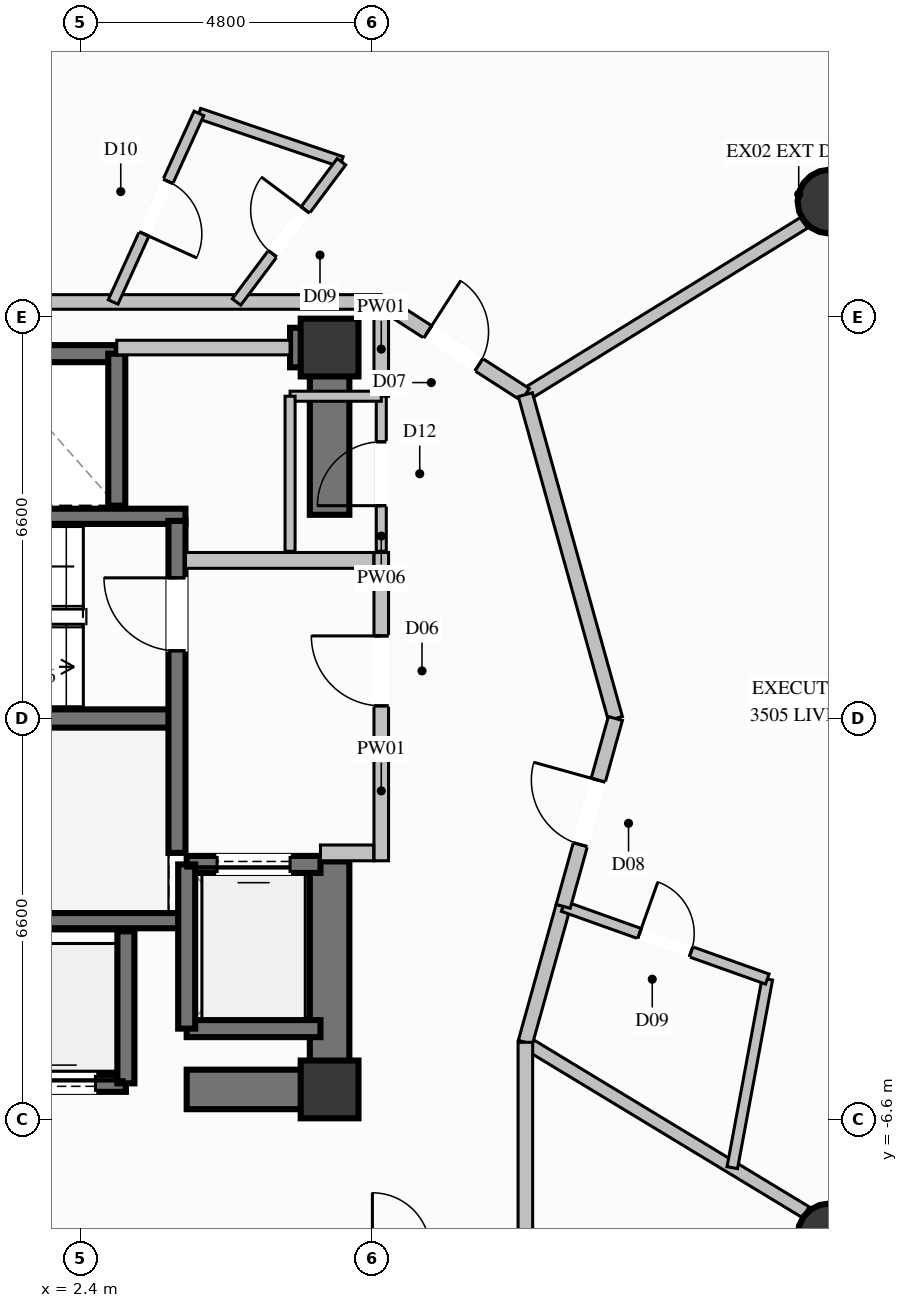
"""IFC4 building model, lengths in metres.
Left out: names, types, materials, properties, quantities, classifications, styles, units other than length and angle.
Written with IfcOpenShell. Run it as: python <this file> out.ifc"""

import sys

from ifc_helpers import new_model, si_unit, direction, frame, frame_2d, origin, origin_2d, place, context, subcontext, project, spatial, rectangle, circle, extrude, element, fill, save


model = new_model("IFC4")
c1 = context("Model", 3, precision=1e-05, world=origin(), true_north=direction((0.0, 1.0)))
c2 = subcontext(c1, "Body", "Model", "MODEL_VIEW")
j1 = project(units=[si_unit("LENGTHUNIT", "METRE"), si_unit("PLANEANGLEUNIT", "RADIAN")], contexts=[c1])
p1 = place(None, origin())
s1 = spatial("IfcSite", under=j1, at=p1, CompositionType="ELEMENT")
p2 = place(p1, origin())
s2 = spatial("IfcBuilding", under=s1, at=p2, CompositionType="ELEMENT")
p3 = place(p2, frame((0.0, 0.0, 131.4)))
s3 = spatial("IfcBuildingStorey", under=s2, at=p3, CompositionType="ELEMENT", Elevation=131.4)
for number, where, z_axis, x_axis in (
    (1, (6.5, -6.1, 0.0), (0.0, 0.0, 1.0), (1.0, 0.0, 0.0)),
    (2, (6.5, 6.1, 0.0), (0.0, 0.0, 1.0), (1.0, 0.0, 0.0)),
):
    element("IfcColumn", number, at=place(p3, frame(where, z_axis=z_axis, x_axis=x_axis)), inside=s3, PredefinedType="COLUMN", context=c2, shape_type="SweptSolid", body=[
        extrude(rectangle(XDim=0.95, YDim=0.95, at=origin_2d()), origin(), (0.0, 0.0, 1.0), 3.6),
    ])
p4 = place(p3, frame((-3.99, 0.0, 0.0), z_axis=(0.0, 0.0, 1.0), x_axis=(1.0, 0.0, 0.0)))
e3 = element("IfcWall", 3, at=p4, inside=s3, PredefinedType="SHEAR", context=c2, shape_type="SweptSolid", body=[
    extrude(rectangle(XDim=7.98, YDim=0.3, at=frame_2d((3.99, 0.0))), origin(), (0.0, 0.0, 1.0), 3.6),
])
for number, where, z_axis, x_axis in (
    (4, (-4.13, -3.325, 0.0), (0.0, 0.0, 1.0), (1.0, 0.0, 0.0)),
    (5, (-4.13, 3.325, 0.0), (0.0, 0.0, 1.0), (1.0, 0.0, 0.0)),
):
    element("IfcWall", number, at=place(p3, frame(where, z_axis=z_axis, x_axis=x_axis)), inside=s3, PredefinedType="SOLIDWALL", context=c2, shape_type="SweptSolid", body=[
        extrude(rectangle(XDim=8.26, YDim=0.25, at=frame_2d((4.13, 0.0))), origin(), (0.0, 0.0, 1.0), 3.6),
    ])
p5 = place(p3, frame((4.15, -6.1, 0.0), z_axis=(0.0, 0.0, 1.0), x_axis=(1.0, 0.0, 0.0)))
e6 = element("IfcWall", 6, at=p5, inside=s3, PredefinedType="SHEAR", context=c2, shape_type="SweptSolid", body=[
    extrude(rectangle(XDim=2.025, YDim=0.65, at=frame_2d((1.013, 0.0))), origin(), (0.0, 0.0, 1.0), 3.6),
])
p6 = place(p3, frame((5.85, 6.1, 0.0), z_axis=(0.0, 0.0, 1.0), x_axis=(1.0, 0.0, 0.0)))
e7 = element("IfcWall", 7, at=p6, inside=s3, PredefinedType="SHEAR", context=c2, shape_type="SweptSolid", body=[
    extrude(rectangle(XDim=0.325, YDim=0.65, at=frame_2d((0.163, 0.0))), origin(), (0.0, 0.0, 1.0), 3.6),
])
p7 = place(p3, frame((6.5, -6.425, 0.0), z_axis=(0.0, 0.0, 1.0), x_axis=(0.0, 1.0, 0.0)))
e8 = element("IfcWall", 8, at=p7, inside=s3, PredefinedType="SHEAR", context=c2, shape_type="SweptSolid", body=[
    extrude(rectangle(XDim=4.075, YDim=0.65, at=frame_2d((2.038, 0.0))), origin(), (0.0, 0.0, 1.0), 3.6),
])
p8 = place(p3, frame((6.5, 3.35, 0.0), z_axis=(0.0, 0.0, 1.0), x_axis=(0.0, 1.0, 0.0)))
e9 = element("IfcWall", 9, at=p8, inside=s3, PredefinedType="SHEAR", context=c2, shape_type="SweptSolid", body=[
    extrude(rectangle(XDim=3.075, YDim=0.65, at=frame_2d((1.538, 0.0))), origin(), (0.0, 0.0, 1.0), 3.6),
])
for number, where, z_axis, x_axis in (
    (10, (14.722, 8.5, 0.0), (0.0, 0.0, 1.0), (1.0, 0.0, 0.0)),
    (11, (14.722, -8.5, 0.0), (0.0, 0.0, 1.0), (1.0, 0.0, 0.0)),
):
    element("IfcColumn", number, at=place(p3, frame(where, z_axis=z_axis, x_axis=x_axis)), inside=s3, PredefinedType="COLUMN", context=c2, shape_type="SweptSolid", body=[
        extrude(circle(Radius=0.525, at=origin_2d()), origin(), (0.0, 0.0, 1.0), 3.6),
    ])
p9 = place(p3, frame((11.78, 15.585, 0.0), z_axis=(0.0, 0.0, 1.0), x_axis=(0.679203838045, -0.733949689274, 0.0)))
e12 = element("IfcWall", 12, at=p9, inside=s3, PredefinedType="SOLIDWALL", context=c2, shape_type="SweptSolid", body=[
    extrude(rectangle(XDim=7.559, YDim=0.32, at=frame_2d((3.779, 0.0))), origin(), (0.0, 0.0, 1.0), 3.35),
])
p10 = place(p9, frame((3.229, 0.0, 0.0)))
e13 = element("IfcOpeningElement", 13, at=p10, cuts=e12, PredefinedType="OPENING", context=c2, shape_type="SweptSolid", body=[
    extrude(rectangle(XDim=1.1, YDim=2.2, at=frame_2d((0.55, 1.1))), frame((0.0, 0.17, 0.0), z_axis=(0.0, -1.0, 0.0), x_axis=(1.0, 0.0, 0.0)), (0.0, 0.0, 1.0), 0.34),
])
p11 = place(p3, frame((1.05, -6.0, 0.0), z_axis=(0.0, 0.0, 1.0), x_axis=(1.0, 0.0, 0.0)))
e14 = element("IfcWall", 14, at=p11, inside=s3, PredefinedType="SOLIDWALL", context=c2, shape_type="SweptSolid", body=[
    extrude(rectangle(XDim=2.1, YDim=0.28, at=frame_2d((1.05, 0.0))), origin(), (0.0, 0.0, 1.0), 3.35),
])
p12 = place(p11, frame((0.5, 0.0, 0.0)))
e15 = element("IfcOpeningElement", 15, at=p12, cuts=e14, PredefinedType="OPENING", context=c2, shape_type="SweptSolid", body=[
    extrude(rectangle(XDim=1.1, YDim=2.2, at=frame_2d((0.55, 1.1))), frame((0.0, 0.15, 0.0), z_axis=(0.0, -1.0, 0.0), x_axis=(1.0, 0.0, 0.0)), (0.0, 0.0, 1.0), 0.3),
])
p13 = place(p3, frame((3.15, -6.0, 0.0), z_axis=(0.0, 0.0, 1.0), x_axis=(0.0, 1.0, 0.0)))
e16 = element("IfcWall", 16, at=p13, inside=s3, PredefinedType="SOLIDWALL", context=c2, shape_type="SweptSolid", body=[
    extrude(rectangle(XDim=2.5, YDim=0.28, at=frame_2d((1.25, 0.0))), origin(), (0.0, 0.0, 1.0), 3.35),
])
p14 = place(p3, frame((3.0, 6.0, 0.0), z_axis=(0.0, 0.0, 1.0), x_axis=(-1.0, 0.0, 0.0)))
e17 = element("IfcWall", 17, at=p14, inside=s3, PredefinedType="SOLIDWALL", context=c2, shape_type="SweptSolid", body=[
    extrude(rectangle(XDim=2.2, YDim=0.28, at=frame_2d((1.1, 0.0))), origin(), (0.0, 0.0, 1.0), 3.35),
])
p15 = place(p3, frame((3.0, 3.5, 0.0), z_axis=(0.0, 0.0, 1.0), x_axis=(0.0, 1.0, 0.0)))
e18 = element("IfcWall", 18, at=p15, inside=s3, PredefinedType="SOLIDWALL", context=c2, shape_type="SweptSolid", body=[
    extrude(rectangle(XDim=2.5, YDim=0.28, at=frame_2d((1.25, 0.0))), origin(), (0.0, 0.0, 1.0), 3.35),
])
p16 = place(p3, frame((4.15, -5.1, 0.0), z_axis=(0.0, 0.0, 1.0), x_axis=(1.0, 0.0, 0.0)))
e19 = element("IfcWall", 19, at=p16, inside=s3, PredefinedType="SOLIDWALL", context=c2, shape_type="SweptSolid", body=[
    extrude(rectangle(XDim=2.2, YDim=0.28, at=frame_2d((1.1, 0.0))), origin(), (0.0, 0.0, 1.0), 3.35),
])
p17 = place(p3, frame((6.35, -2.4, 0.0), z_axis=(0.0, 0.0, 1.0), x_axis=(-1.0, 0.0, 0.0)))
e20 = element("IfcWall", 20, at=p17, inside=s3, PredefinedType="SOLIDWALL", context=c2, shape_type="SweptSolid", body=[
    extrude(rectangle(XDim=2.2, YDim=0.28, at=frame_2d((1.1, 0.0))), origin(), (0.0, 0.0, 1.0), 3.35),
])
p18 = place(p17, frame((0.5, 0.0, 0.0)))
e21 = element("IfcOpeningElement", 21, at=p18, cuts=e20, PredefinedType="OPENING", context=c2, shape_type="SweptSolid", body=[
    extrude(rectangle(XDim=1.2, YDim=2.2, at=frame_2d((0.6, 1.1))), frame((0.0, 0.15, 0.0), z_axis=(0.0, -1.0, 0.0), x_axis=(1.0, 0.0, 0.0)), (0.0, 0.0, 1.0), 0.3),
])
p19 = place(p3, frame((4.15, -2.4, 0.0), z_axis=(0.0, 0.0, 1.0), x_axis=(0.0, -1.0, 0.0)))
e22 = element("IfcWall", 22, at=p19, inside=s3, PredefinedType="SOLIDWALL", context=c2, shape_type="SweptSolid", body=[
    extrude(rectangle(XDim=2.7, YDim=0.28, at=frame_2d((1.35, 0.0))), origin(), (0.0, 0.0, 1.0), 3.35),
])
p20 = place(p3, frame((3.99, -2.21, 0.0), z_axis=(0.0, 0.0, 1.0), x_axis=(0.0, 1.0, 0.0)))
e23 = element("IfcWall", 23, at=p20, inside=s3, PredefinedType="SOLIDWALL", context=c2, shape_type="SweptSolid", body=[
    extrude(rectangle(XDim=5.46, YDim=0.28, at=frame_2d((2.73, 0.0))), origin(), (0.0, 0.0, 1.0), 3.35),
])
p21 = place(p20, frame((3.323, 0.0, 0.0)))
e24 = element("IfcOpeningElement", 24, at=p21, cuts=e23, PredefinedType="OPENING", context=c2, shape_type="SweptSolid", body=[
    extrude(rectangle(XDim=1.2, YDim=2.2, at=frame_2d((0.6, 1.1))), frame((0.0, 0.15, 0.0), z_axis=(0.0, -1.0, 0.0), x_axis=(1.0, 0.0, 0.0)), (0.0, 0.0, 1.0), 0.3),
])
p22 = place(p3, frame((7.35, -2.34, 0.0), z_axis=(0.0, 0.0, 1.0), x_axis=(0.0, 1.0, 0.0)))
e25 = element("IfcWall", 25, at=p22, inside=s3, PredefinedType="PARTITIONING", context=c2, shape_type="SweptSolid", body=[
    extrude(rectangle(XDim=5.07, YDim=0.24, at=frame_2d((2.535, 0.0))), origin(), (0.0, 0.0, 1.0), 2.435),
])
p23 = place(p22, frame((2.548, 0.0, 0.0)))
e26 = element("IfcOpeningElement", 26, at=p23, cuts=e25, PredefinedType="OPENING", context=c2, shape_type="SweptSolid", body=[
    extrude(rectangle(XDim=1.15, YDim=2.2, at=frame_2d((0.575, 1.1))), frame((0.0, 0.13, 0.0), z_axis=(0.0, -1.0, 0.0), x_axis=(1.0, 0.0, 0.0)), (0.0, 0.0, 1.0), 0.26),
])
p24 = place(p3, frame((6.35, -2.21, 0.0), z_axis=(0.0, 0.0, 1.0), x_axis=(1.0, 0.0, 0.0)))
e27 = element("IfcWall", 27, at=p24, inside=s3, PredefinedType="PARTITIONING", context=c2, shape_type="SweptSolid", body=[
    extrude(rectangle(XDim=0.875, YDim=0.26, at=frame_2d((0.438, 0.0))), origin(), (0.0, 0.0, 1.0), 3.35),
])
p25 = place(p3, frame((4.13, 2.6, 0.0), z_axis=(0.0, 0.0, 1.0), x_axis=(1.0, 0.0, 0.0)))
e28 = element("IfcWall", 28, at=p25, inside=s3, PredefinedType="PARTITIONING", context=c2, shape_type="SweptSolid", body=[
    extrude(rectangle(XDim=3.095, YDim=0.26, at=frame_2d((1.548, 0.0))), origin(), (0.0, 0.0, 1.0), 3.35),
])
p26 = place(p3, frame((-7.35, 6.85, 0.0), z_axis=(0.0, 0.0, 1.0), x_axis=(1.0, 0.0, 0.0)))
e29 = element("IfcWall", 29, at=p26, inside=s3, PredefinedType="PARTITIONING", context=c2, shape_type="SweptSolid", body=[
    extrude(rectangle(XDim=14.7, YDim=0.24, at=frame_2d((7.35, 0.0))), origin(), (0.0, 0.0, 1.0), 2.435),
])
p27 = place(p3, frame((7.35, 5.3, 0.0), z_axis=(0.0, 0.0, 1.0), x_axis=(0.0, 1.0, 0.0)))
e30 = element("IfcWall", 30, at=p27, inside=s3, PredefinedType="PARTITIONING", context=c2, shape_type="SweptSolid", body=[
    extrude(rectangle(XDim=1.55, YDim=0.24, at=frame_2d((0.775, 0.0))), origin(), (0.0, 0.0, 1.0), 2.435),
])
p28 = place(p3, frame((3.0, 6.1, 0.0), z_axis=(0.0, 0.0, 1.0), x_axis=(1.0, 0.0, 0.0)))
e31 = element("IfcWall", 31, at=p28, inside=s3, PredefinedType="PARTITIONING", context=c2, shape_type="SweptSolid", body=[
    extrude(rectangle(XDim=2.85, YDim=0.24, at=frame_2d((1.425, 0.0))), origin(), (0.0, 0.0, 1.0), 2.435),
])
p29 = place(p3, frame((7.35, 2.75, 0.0), z_axis=(0.0, 0.0, 1.0), x_axis=(0.0, 1.0, 0.0)))
e32 = element("IfcWall", 32, at=p29, inside=s3, PredefinedType="PARTITIONING", context=c2, shape_type="SweptSolid", body=[
    extrude(rectangle(XDim=2.55, YDim=0.165, at=frame_2d((1.275, 0.0))), origin(), (0.0, 0.0, 1.0), 3.35),
])
p30 = place(p29, frame((0.75, 0.0, 0.0)))
e33 = element("IfcOpeningElement", 33, at=p30, cuts=e32, PredefinedType="OPENING", context=c2, shape_type="SweptSolid", body=[
    extrude(rectangle(XDim=1.05, YDim=2.15, at=frame_2d((0.525, 1.075))), frame((0.0, 0.093, 0.0), z_axis=(0.0, -1.0, 0.0), x_axis=(1.0, 0.0, 0.0)), (0.0, 0.0, 1.0), 0.185),
])
p31 = place(p3, frame((7.35, 5.3, 0.0), z_axis=(0.0, 0.0, 1.0), x_axis=(-1.0, 0.0, 0.0)))
e34 = element("IfcWall", 34, at=p31, inside=s3, PredefinedType="PARTITIONING", context=c2, shape_type="SweptSolid", body=[
    extrude(rectangle(XDim=1.5, YDim=0.165, at=frame_2d((0.75, 0.0))), origin(), (0.0, 0.0, 1.0), 2.435),
])
p32 = place(p3, frame((5.85, 5.3, 0.0), z_axis=(0.0, 0.0, 1.0), x_axis=(0.0, -1.0, 0.0)))
e35 = element("IfcWall", 35, at=p32, inside=s3, PredefinedType="PARTITIONING", context=c2, shape_type="SweptSolid", body=[
    extrude(rectangle(XDim=2.55, YDim=0.165, at=frame_2d((1.275, 0.0))), origin(), (0.0, 0.0, 1.0), 2.435),
])
p33 = place(p3, frame((9.72, 5.325, 0.0), z_axis=(0.0, 0.0, 1.0), x_axis=(0.851091187082, 0.525017896144, 0.0)))
e36 = element("IfcWall", 36, at=p33, inside=s3, PredefinedType="PARTITIONING", context=c2, shape_type="SweptSolid", body=[
    extrude(rectangle(XDim=5.385, YDim=0.21, at=frame_2d((2.692, 0.0))), origin(), (0.0, 0.0, 1.0), 2.791),
])
p34 = place(p3, frame((9.72, -5.325, 0.0), z_axis=(0.0, 0.0, 1.0), x_axis=(0.855199655735, -0.518298706183, 0.0)))
e37 = element("IfcWall", 37, at=p34, inside=s3, PredefinedType="PARTITIONING", context=c2, shape_type="SweptSolid", body=[
    extrude(rectangle(XDim=5.393, YDim=0.21, at=frame_2d((2.697, 0.0))), origin(), (0.0, 0.0, 1.0), 2.791),
])
p35 = place(p3, frame((4.351, 9.951, 0.0), z_axis=(0.0, 0.0, 1.0), x_axis=(0.947023172819, -0.321165238069, 0.0)))
e38 = element("IfcWall", 38, at=p35, inside=s3, PredefinedType="PLUMBINGWALL", context=c2, shape_type="SweptSolid", body=[
    extrude(rectangle(XDim=2.475, YDim=0.175, at=frame_2d((1.238, 0.0))), origin(), (0.0, 0.0, 1.0), 3.35),
])
p36 = place(p3, frame((4.351, 9.951, 0.0), z_axis=(0.0, 0.0, 1.0), x_axis=(-0.414207844199, -0.910182323386, 0.0)))
e39 = element("IfcWall", 39, at=p36, inside=s3, PredefinedType="PLUMBINGWALL", context=c2, shape_type="SweptSolid", body=[
    extrude(rectangle(XDim=3.407, YDim=0.175, at=frame_2d((1.703, 0.0))), origin(), (0.0, 0.0, 1.0), 3.35),
])
p37 = place(p36, frame((1.228, 0.0, 0.0)))
e40 = element("IfcOpeningElement", 40, at=p37, cuts=e39, PredefinedType="OPENING", context=c2, shape_type="SweptSolid", body=[
    extrude(rectangle(XDim=0.95, YDim=2.1, at=frame_2d((0.475, 1.05))), frame((0.0, 0.098, 0.0), z_axis=(0.0, -1.0, 0.0), x_axis=(1.0, 0.0, 0.0)), (0.0, 0.0, 1.0), 0.195),
])
p38 = place(p3, frame((4.969, 6.85, 0.0), z_axis=(0.0, 0.0, 1.0), x_axis=(0.599253850401, 0.800559068888, 0.0)))
e41 = element("IfcWall", 41, at=p38, inside=s3, PredefinedType="PLUMBINGWALL", context=c2, shape_type="SweptSolid", body=[
    extrude(rectangle(XDim=2.88, YDim=0.175, at=frame_2d((1.44, 0.0))), origin(), (0.0, 0.0, 1.0), 2.791),
])
p39 = place(p38, frame((0.99, 0.0, 0.0)))
e42 = element("IfcOpeningElement", 42, at=p39, cuts=e41, PredefinedType="OPENING", context=c2, shape_type="SweptSolid", body=[
    extrude(rectangle(XDim=0.9, YDim=2.1, at=frame_2d((0.45, 1.05))), frame((0.0, 0.098, 0.0), z_axis=(0.0, -1.0, 0.0), x_axis=(1.0, 0.0, 0.0)), (0.0, 0.0, 1.0), 0.195),
])
p40 = place(p3, frame((7.35, 6.85, 0.0), z_axis=(0.0, 0.0, 1.0), x_axis=(0.840910978735, -0.541173471119, 0.0)))
e43 = element("IfcWall", 43, at=p40, inside=s3, PredefinedType="PARTITIONING", context=c2, shape_type="SweptSolid", body=[
    extrude(rectangle(XDim=2.818, YDim=0.24, at=frame_2d((1.409, 0.0))), origin(), (0.0, 0.0, 1.0), 3.35),
])
p41 = place(p40, frame((0.909, 0.0, 0.0)))
e44 = element("IfcOpeningElement", 44, at=p41, cuts=e43, PredefinedType="OPENING", context=c2, shape_type="SweptSolid", body=[
    extrude(rectangle(XDim=1.0, YDim=2.2, at=frame_2d((0.5, 1.1))), frame((0.0, 0.13, 0.0), z_axis=(0.0, -1.0, 0.0), x_axis=(1.0, 0.0, 0.0)), (0.0, 0.0, 1.0), 0.26),
])
p42 = place(p3, frame((9.72, -5.325, 0.0), z_axis=(0.0, 0.0, 1.0), x_axis=(0.268045342481, 0.963406297662, 0.0)))
e45 = element("IfcWall", 45, at=p42, inside=s3, PredefinedType="PARTITIONING", context=c2, shape_type="SweptSolid", body=[
    extrude(rectangle(XDim=2.321, YDim=0.24, at=frame_2d((1.16, 0.0))), origin(), (0.0, 0.0, 1.0), 3.35),
])
p43 = place(p3, frame((13.123, -7.387, 0.0), z_axis=(0.0, 0.0, 1.0), x_axis=(0.182540901641, 0.983198260387, 0.0)))
e46 = element("IfcWall", 46, at=p43, inside=s3, PredefinedType="PLUMBINGWALL", context=c2, shape_type="SweptSolid", body=[
    extrude(rectangle(XDim=3.155, YDim=0.175, at=frame_2d((1.578, 0.0))), origin(), (0.0, 0.0, 1.0), 3.35),
])
p44 = place(p3, frame((10.342, -3.089, 0.0), z_axis=(0.0, 0.0, 1.0), x_axis=(0.942017496202, -0.335563759738, 0.0)))
e47 = element("IfcWall", 47, at=p44, inside=s3, PredefinedType="PLUMBINGWALL", context=c2, shape_type="SweptSolid", body=[
    extrude(rectangle(XDim=3.563, YDim=0.175, at=frame_2d((1.782, 0.0))), origin(), (0.0, 0.0, 1.0), 3.35),
])
p45 = place(p44, frame((1.332, 0.0, 0.0)))
e48 = element("IfcOpeningElement", 48, at=p45, cuts=e47, PredefinedType="OPENING", context=c2, shape_type="SweptSolid", body=[
    extrude(rectangle(XDim=0.9, YDim=2.1, at=frame_2d((0.45, 1.05))), frame((0.0, 0.098, 0.0), z_axis=(0.0, -1.0, 0.0), x_axis=(1.0, 0.0, 0.0)), (0.0, 0.0, 1.0), 0.195),
])
p46 = place(p3, frame((11.2, 0.0, 0.0), z_axis=(0.0, 0.0, 1.0), x_axis=(-0.267782838254, 0.963479294815, 0.0)))
e49 = element("IfcWall", 49, at=p46, inside=s3, PredefinedType="PARTITIONING", context=c2, shape_type="SweptSolid", body=[
    extrude(rectangle(XDim=5.527, YDim=0.24, at=frame_2d((2.763, 0.0))), origin(), (0.0, 0.0, 1.0), 2.985),
])
p47 = place(p3, frame((10.342, -3.089, 0.0), z_axis=(0.0, 0.0, 1.0), x_axis=(0.267592805492, 0.963532091032, 0.0)))
e50 = element("IfcWall", 50, at=p47, inside=s3, PredefinedType="PARTITIONING", context=c2, shape_type="SweptSolid", body=[
    extrude(rectangle(XDim=3.206, YDim=0.24, at=frame_2d((1.603, 0.0))), origin(), (0.0, 0.0, 1.0), 2.985),
])
p48 = place(p47, frame((1.053, 0.0, 0.0)))
e51 = element("IfcOpeningElement", 51, at=p48, cuts=e50, PredefinedType="OPENING", context=c2, shape_type="SweptSolid", body=[
    extrude(rectangle(XDim=1.1, YDim=2.3, at=frame_2d((0.55, 1.15))), frame((0.0, 0.13, 0.0), z_axis=(0.0, -1.0, 0.0), x_axis=(1.0, 0.0, 0.0)), (0.0, 0.0, 1.0), 0.26),
])
p49 = place(p3, frame((9.72, -8.75, 0.0), z_axis=(0.0, 0.0, 1.0), x_axis=(0.0, 1.0, 0.0)))
e52 = element("IfcWall", 52, at=p49, inside=s3, PredefinedType="PARTITIONING", context=c2, shape_type="SweptSolid", body=[
    extrude(rectangle(XDim=3.425, YDim=0.24, at=frame_2d((1.712, 0.0))), origin(), (0.0, 0.0, 1.0), 3.35),
])
p50 = place(p12, origin())
e53 = element("IfcDoor", 53, at=p50, inside=s3, OperationType="SLIDING_TO_LEFT", PredefinedType="DOOR", context=c2, shape_type="SweptSolid", body=[
    extrude(rectangle(XDim=1.1, YDim=2.2, at=frame_2d((0.55, 1.1))), frame((0.0, 0.025, 0.0), z_axis=(0.0, -1.0, 0.0), x_axis=(1.0, 0.0, 0.0)), (0.0, 0.0, 1.0), 0.05),
])
fill(e15, e53)
p51 = place(p18, origin())
e54 = element("IfcDoor", 54, at=p51, inside=s3, OperationType="SLIDING_TO_LEFT", PredefinedType="DOOR", context=c2, shape_type="SweptSolid", body=[
    extrude(rectangle(XDim=1.2, YDim=2.2, at=frame_2d((0.6, 1.1))), frame((0.0, 0.025, 0.0), z_axis=(0.0, -1.0, 0.0), x_axis=(1.0, 0.0, 0.0)), (0.0, 0.0, 1.0), 0.05),
])
fill(e21, e54)
p52 = place(p21, origin())
e55 = element("IfcDoor", 55, at=p52, inside=s3, OperationType="SINGLE_SWING_RIGHT", PredefinedType="DOOR", context=c2, shape_type="SweptSolid", body=[
    extrude(rectangle(XDim=1.2, YDim=2.2, at=frame_2d((0.6, 1.1))), frame((0.0, 0.025, 0.0), z_axis=(0.0, -1.0, 0.0), x_axis=(1.0, 0.0, 0.0)), (0.0, 0.0, 1.0), 0.05),
])
fill(e24, e55)
p53 = place(p23, origin())
e56 = element("IfcDoor", 56, at=p53, inside=s3, OperationType="SINGLE_SWING_RIGHT", PredefinedType="DOOR", context=c2, shape_type="SweptSolid", body=[
    extrude(rectangle(XDim=1.15, YDim=2.2, at=frame_2d((0.575, 1.1))), frame((0.0, 0.025, 0.0), z_axis=(0.0, -1.0, 0.0), x_axis=(1.0, 0.0, 0.0)), (0.0, 0.0, 1.0), 0.05),
])
fill(e26, e56)
p54 = place(p30, origin())
e57 = element("IfcDoor", 57, at=p54, inside=s3, OperationType="SINGLE_SWING_LEFT", PredefinedType="DOOR", context=c2, shape_type="SweptSolid", body=[
    extrude(rectangle(XDim=1.05, YDim=2.15, at=frame_2d((0.525, 1.075))), frame((0.0, 0.025, 0.0), z_axis=(0.0, -1.0, 0.0), x_axis=(1.0, 0.0, 0.0)), (0.0, 0.0, 1.0), 0.05),
])
fill(e33, e57)
p55 = place(p39, origin())
e58 = element("IfcDoor", 58, at=p55, inside=s3, OperationType="SINGLE_SWING_RIGHT", PredefinedType="DOOR", context=c2, shape_type="SweptSolid", body=[
    extrude(rectangle(XDim=0.9, YDim=2.1, at=frame_2d((0.45, 1.05))), frame((0.0, 0.025, 0.0), z_axis=(0.0, -1.0, 0.0), x_axis=(1.0, 0.0, 0.0)), (0.0, 0.0, 1.0), 0.05),
])
fill(e42, e58)
p56 = place(p41, origin())
e59 = element("IfcDoor", 59, at=p56, inside=s3, OperationType="SINGLE_SWING_LEFT", PredefinedType="DOOR", context=c2, shape_type="SweptSolid", body=[
    extrude(rectangle(XDim=1.0, YDim=2.2, at=frame_2d((0.5, 1.1))), frame((0.0, 0.025, 0.0), z_axis=(0.0, -1.0, 0.0), x_axis=(1.0, 0.0, 0.0)), (0.0, 0.0, 1.0), 0.05),
])
fill(e44, e59)
p57 = place(p37, origin())
e60 = element("IfcDoor", 60, at=p57, inside=s3, OperationType="SINGLE_SWING_RIGHT", PredefinedType="DOOR", context=c2, shape_type="SweptSolid", body=[
    extrude(rectangle(XDim=0.95, YDim=2.1, at=frame_2d((0.475, 1.05))), frame((0.0, 0.025, 0.0), z_axis=(0.0, -1.0, 0.0), x_axis=(1.0, 0.0, 0.0)), (0.0, 0.0, 1.0), 0.05),
])
fill(e40, e60)
p58 = place(p45, origin())
e61 = element("IfcDoor", 61, at=p58, inside=s3, OperationType="SINGLE_SWING_LEFT", PredefinedType="DOOR", context=c2, shape_type="SweptSolid", body=[
    extrude(rectangle(XDim=0.9, YDim=2.1, at=frame_2d((0.45, 1.05))), frame((0.0, 0.025, 0.0), z_axis=(0.0, -1.0, 0.0), x_axis=(1.0, 0.0, 0.0)), (0.0, 0.0, 1.0), 0.05),
])
fill(e48, e61)
p59 = place(p48, origin())
e62 = element("IfcDoor", 62, at=p59, inside=s3, OperationType="SINGLE_SWING_RIGHT", PredefinedType="DOOR", context=c2, shape_type="SweptSolid", body=[
    extrude(rectangle(XDim=1.1, YDim=2.3, at=frame_2d((0.55, 1.15))), frame((0.0, 0.025, 0.0), z_axis=(0.0, -1.0, 0.0), x_axis=(1.0, 0.0, 0.0)), (0.0, 0.0, 1.0), 0.05),
])
fill(e51, e62)
save(model, sys.argv[1])
